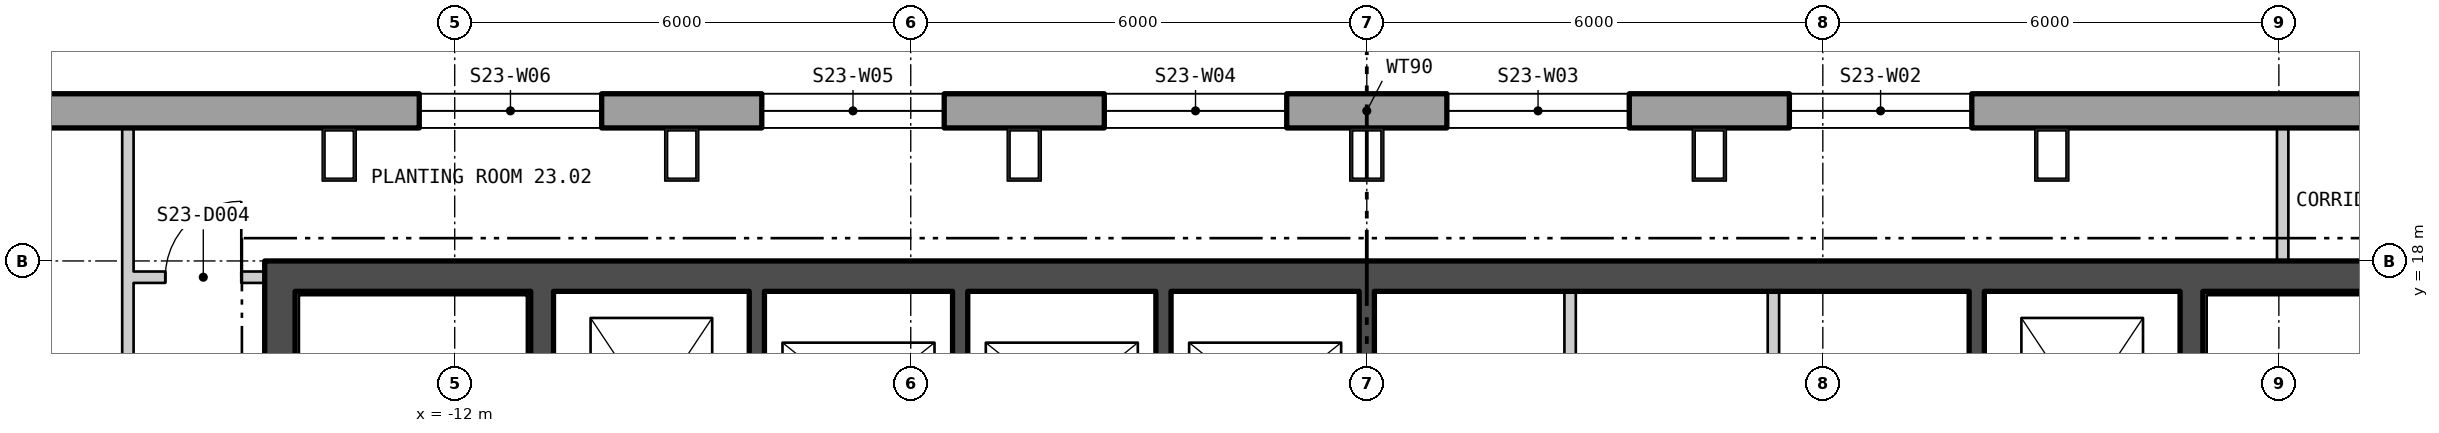
"""IFC4 building model, lengths in metres.
Left out: names, types, materials, properties, quantities, classifications, styles, units other than length and angle.
Written with IfcOpenShell. Run it as: python <this file> out.ifc"""

import sys

from ifc_helpers import new_model, si_unit, direction, frame, frame_2d, origin, origin_2d, place, context, subcontext, project, spatial, polyline, rectangle, hollow_rectangle, outline, extrude, element, fill, save


model = new_model("IFC4")
c1 = context("Model", 3, precision=1e-05, world=origin(), true_north=direction((0.0, 1.0)))
c2 = subcontext(c1, "Body", "Model", "MODEL_VIEW")
j1 = project(units=[si_unit("LENGTHUNIT", "METRE"), si_unit("PLANEANGLEUNIT", "RADIAN")], contexts=[c1])
p1 = place(None, origin())
s1 = spatial("IfcSite", under=j1, at=p1, CompositionType="ELEMENT")
p2 = place(p1, origin())
s2 = spatial("IfcBuilding", under=s1, at=p2, CompositionType="ELEMENT")
p3 = place(p2, frame((0.0, 0.0, 304.2)))
s3 = spatial("IfcBuildingStorey", under=s2, at=p3, CompositionType="ELEMENT", Elevation=304.2)
for number, where, z_axis, x_axis in (
    (1, (9.013, 19.4, 0.0), (0.0, 0.0, 1.0), (-1.0, 0.0, 0.0)),
    (2, (4.507, 19.4, 0.0), (0.0, 0.0, 1.0), (-1.0, 0.0, 0.0)),
    (3, (0.0, 19.4, 0.0), (0.0, 0.0, 1.0), (-1.0, 0.0, 0.0)),
    (4, (-4.507, 19.4, 0.0), (0.0, 0.0, 1.0), (-1.0, 0.0, 0.0)),
    (5, (-9.013, 19.4, 0.0), (0.0, 0.0, 1.0), (-1.0, 0.0, 0.0)),
    (6, (-13.52, 19.4, 0.0), (0.0, 0.0, 1.0), (-1.0, 0.0, 0.0)),
):
    element("IfcColumn", number, at=place(p3, frame(where, z_axis=z_axis, x_axis=x_axis)), inside=s3, PredefinedType="COLUMN", context=c2, shape_type="SweptSolid", body=[
        extrude(hollow_rectangle(XDim=0.45, YDim=0.7, WallThickness=0.04, at=origin_2d()), origin(), (0.0, 0.0, 1.0), 4.2),
    ])
p4 = place(p3, frame((22.865, 19.975, -0.4), z_axis=(0.0, 0.0, 1.0), x_axis=(-1.0, 0.0, 0.0)))
e7 = element("IfcWall", 7, at=p4, inside=s3, PredefinedType="SOLIDWALL", context=c2, shape_type="SweptSolid", body=[
    extrude(outline(polyline([(-0.13, -0.225), (45.86, -0.225), (45.6, 0.225), (0.13, 0.225), (-0.13, -0.225)])), origin(), (0.0, 0.0, 1.0), 4.2),
])
p5 = place(p4, frame((1.424, 0.0, 1.3)))
e8 = element("IfcOpeningElement", 8, at=p5, cuts=e7, PredefinedType="OPENING", context=c2, shape_type="SweptSolid", body=[
    extrude(rectangle(XDim=2.4, YDim=2.3, at=frame_2d((1.2, 1.15))), frame((0.0, 0.235, 0.0), z_axis=(0.0, -1.0, 0.0), x_axis=(1.0, 0.0, 0.0)), (0.0, 0.0, 1.0), 0.47),
])
p6 = place(p4, frame((14.905, 0.0, 1.3)))
e9 = element("IfcOpeningElement", 9, at=p6, cuts=e7, PredefinedType="OPENING", context=c2, shape_type="SweptSolid", body=[
    extrude(rectangle(XDim=2.4, YDim=2.3, at=frame_2d((1.2, 1.15))), frame((0.0, 0.235, 0.0), z_axis=(0.0, -1.0, 0.0), x_axis=(1.0, 0.0, 0.0)), (0.0, 0.0, 1.0), 0.47),
])
p7 = place(p4, frame((19.412, 0.0, 1.3)))
e10 = element("IfcOpeningElement", 10, at=p7, cuts=e7, PredefinedType="OPENING", context=c2, shape_type="SweptSolid", body=[
    extrude(rectangle(XDim=2.4, YDim=2.3, at=frame_2d((1.2, 1.15))), frame((0.0, 0.235, 0.0), z_axis=(0.0, -1.0, 0.0), x_axis=(1.0, 0.0, 0.0)), (0.0, 0.0, 1.0), 0.47),
])
p8 = place(p4, frame((23.918, 0.0, 1.3)))
e11 = element("IfcOpeningElement", 11, at=p8, cuts=e7, PredefinedType="OPENING", context=c2, shape_type="SweptSolid", body=[
    extrude(rectangle(XDim=2.4, YDim=2.3, at=frame_2d((1.2, 1.15))), frame((0.0, 0.235, 0.0), z_axis=(0.0, -1.0, 0.0), x_axis=(1.0, 0.0, 0.0)), (0.0, 0.0, 1.0), 0.47),
])
p9 = place(p4, frame((28.425, 0.0, 1.3)))
e12 = element("IfcOpeningElement", 12, at=p9, cuts=e7, PredefinedType="OPENING", context=c2, shape_type="SweptSolid", body=[
    extrude(rectangle(XDim=2.4, YDim=2.3, at=frame_2d((1.2, 1.15))), frame((0.0, 0.235, 0.0), z_axis=(0.0, -1.0, 0.0), x_axis=(1.0, 0.0, 0.0)), (0.0, 0.0, 1.0), 0.47),
])
p10 = place(p4, frame((32.932, 0.0, 1.3)))
e13 = element("IfcOpeningElement", 13, at=p10, cuts=e7, PredefinedType="OPENING", context=c2, shape_type="SweptSolid", body=[
    extrude(rectangle(XDim=2.4, YDim=2.3, at=frame_2d((1.2, 1.15))), frame((0.0, 0.235, 0.0), z_axis=(0.0, -1.0, 0.0), x_axis=(1.0, 0.0, 0.0)), (0.0, 0.0, 1.0), 0.47),
])
p11 = place(p4, frame((41.907, 0.0, 1.3)))
e14 = element("IfcOpeningElement", 14, at=p11, cuts=e7, PredefinedType="OPENING", context=c2, shape_type="SweptSolid", body=[
    extrude(rectangle(XDim=2.4, YDim=2.3, at=frame_2d((1.2, 1.15))), frame((0.0, 0.235, 0.0), z_axis=(0.0, -1.0, 0.0), x_axis=(1.0, 0.0, 0.0)), (0.0, 0.0, 1.0), 0.47),
])
p12 = place(p3, frame((-14.5, 17.8, 0.0), z_axis=(0.0, 0.0, 1.0), x_axis=(1.0, 0.0, 0.0)))
e15 = element("IfcWall", 15, at=p12, inside=s3, PredefinedType="SHEAR", context=c2, shape_type="SweptSolid", body=[
    extrude(rectangle(XDim=29.0, YDim=0.4, at=frame_2d((14.5, 0.0))), origin(), (0.0, 0.0, 1.0), 4.0),
])
p13 = place(p3, frame((-14.3, 4.4, 0.0), z_axis=(0.0, 0.0, 1.0), x_axis=(0.0, 1.0, 0.0)))
e16 = element("IfcWall", 16, at=p13, inside=s3, PredefinedType="SHEAR", context=c2, shape_type="SweptSolid", body=[
    extrude(rectangle(XDim=13.2, YDim=0.4, at=frame_2d((6.6, 0.0))), origin(), (0.0, 0.0, 1.0), 4.0),
])
p14 = place(p13, frame((3.05, 0.0, 0.0)))
e17 = element("IfcOpeningElement", 17, at=p14, cuts=e16, PredefinedType="OPENING", context=c2, shape_type="SweptSolid", body=[
    extrude(rectangle(XDim=1.5, YDim=2.1, at=frame_2d((0.75, 1.05))), frame((0.0, 0.21, 0.0), z_axis=(0.0, -1.0, 0.0), x_axis=(1.0, 0.0, 0.0)), (0.0, 0.0, 1.0), 0.42),
])
p15 = place(p3, frame((-10.85, 4.4, 0.0), z_axis=(0.0, 0.0, 1.0), x_axis=(0.0, 1.0, 0.0)))
e18 = element("IfcWall", 18, at=p15, inside=s3, PredefinedType="SHEAR", context=c2, shape_type="SweptSolid", body=[
    extrude(rectangle(XDim=13.2, YDim=0.3, at=frame_2d((6.6, 0.0))), origin(), (0.0, 0.0, 1.0), 4.0),
])
p16 = place(p15, frame((1.575, 0.0, 0.0)))
e19 = element("IfcOpeningElement", 19, at=p16, cuts=e18, PredefinedType="OPENING", context=c2, shape_type="SweptSolid", body=[
    extrude(rectangle(XDim=1.25, YDim=2.1, at=frame_2d((0.625, 1.05))), frame((0.0, 0.16, 0.0), z_axis=(0.0, -1.0, 0.0), x_axis=(1.0, 0.0, 0.0)), (0.0, 0.0, 1.0), 0.32),
])
p17 = place(p15, frame((0.4, 0.0, 0.0)))
e20 = element("IfcOpeningElement", 20, at=p17, cuts=e18, PredefinedType="OPENING", context=c2, shape_type="SweptSolid", body=[
    extrude(rectangle(XDim=0.9, YDim=2.1, at=frame_2d((0.45, 1.05))), frame((0.0, 0.16, 0.0), z_axis=(0.0, -1.0, 0.0), x_axis=(1.0, 0.0, 0.0)), (0.0, 0.0, 1.0), 0.32),
])
p18 = place(p3, frame((10.85, 4.4, 0.0), z_axis=(0.0, 0.0, 1.0), x_axis=(0.0, 1.0, 0.0)))
e21 = element("IfcWall", 21, at=p18, inside=s3, PredefinedType="SHEAR", context=c2, shape_type="SweptSolid", body=[
    extrude(rectangle(XDim=13.2, YDim=0.3, at=frame_2d((6.6, 0.0))), origin(), (0.0, 0.0, 1.0), 4.0),
])
p19 = place(p18, frame((1.575, 0.0, 0.0)))
e22 = element("IfcOpeningElement", 22, at=p19, cuts=e21, PredefinedType="OPENING", context=c2, shape_type="SweptSolid", body=[
    extrude(rectangle(XDim=1.25, YDim=2.1, at=frame_2d((0.625, 1.05))), frame((0.0, 0.16, 0.0), z_axis=(0.0, -1.0, 0.0), x_axis=(1.0, 0.0, 0.0)), (0.0, 0.0, 1.0), 0.32),
])
p20 = place(p18, frame((0.4, 0.0, 0.0)))
e23 = element("IfcOpeningElement", 23, at=p20, cuts=e21, PredefinedType="OPENING", context=c2, shape_type="SweptSolid", body=[
    extrude(rectangle(XDim=0.9, YDim=2.1, at=frame_2d((0.45, 1.05))), frame((0.0, 0.16, 0.0), z_axis=(0.0, -1.0, 0.0), x_axis=(1.0, 0.0, 0.0)), (0.0, 0.0, 1.0), 0.32),
])
for number, where, z_axis, x_axis in (
    (24, (-8.025, 14.7, 0.0), (0.0, 0.0, 1.0), (0.0, 1.0, 0.0)),
    (25, (-5.35, 14.7, 0.0), (0.0, 0.0, 1.0), (0.0, 1.0, 0.0)),
    (26, (-2.675, 14.7, 0.0), (0.0, 0.0, 1.0), (0.0, 1.0, 0.0)),
    (27, (0.0, 14.7, 0.0), (0.0, 0.0, 1.0), (0.0, 1.0, 0.0)),
):
    element("IfcWall", number, at=place(p3, frame(where, z_axis=z_axis, x_axis=x_axis)), inside=s3, PredefinedType="SHEAR", context=c2, shape_type="SweptSolid", body=[
        extrude(rectangle(XDim=2.9, YDim=0.2, at=frame_2d((1.45, 0.0))), origin(), (0.0, 0.0, 1.0), 4.0),
    ])
for number, where, z_axis, x_axis in (
    (28, (2.675, 14.7, 0.0), (0.0, 0.0, 1.0), (0.0, 1.0, 0.0)),
    (29, (5.35, 14.7, 0.0), (0.0, 0.0, 1.0), (0.0, 1.0, 0.0)),
):
    element("IfcWall", number, at=place(p3, frame(where, z_axis=z_axis, x_axis=x_axis)), inside=s3, PredefinedType="PARTITIONING", context=c2, shape_type="SweptSolid", body=[
        extrude(rectangle(XDim=2.9, YDim=0.15, at=frame_2d((1.45, 0.0))), origin(), (0.0, 0.0, 1.0), 4.0),
    ])
p21 = place(p3, frame((8.025, 14.7, 0.0), z_axis=(0.0, 0.0, 1.0), x_axis=(0.0, 1.0, 0.0)))
e30 = element("IfcWall", 30, at=p21, inside=s3, PredefinedType="SHEAR", context=c2, shape_type="SweptSolid", body=[
    extrude(rectangle(XDim=2.9, YDim=0.2, at=frame_2d((1.45, 0.0))), origin(), (0.0, 0.0, 1.0), 4.0),
])
p22 = place(p3, frame((-16.3, 2.125, 0.0), z_axis=(0.0, 0.0, 1.0), x_axis=(0.0, 1.0, 0.0)))
e31 = element("IfcWall", 31, at=p22, inside=s3, PredefinedType="PARTITIONING", context=c2, shape_type="SweptSolid", body=[
    extrude(rectangle(XDim=17.623, YDim=0.15, at=frame_2d((8.812, 0.0))), origin(), (0.0, 0.0, 1.0), 4.0),
])
p23 = place(p22, frame((5.078, 0.0, 0.0)))
e32 = element("IfcOpeningElement", 32, at=p23, cuts=e31, PredefinedType="OPENING", context=c2, shape_type="SweptSolid", body=[
    extrude(rectangle(XDim=1.0, YDim=2.1, at=frame_2d((0.5, 1.05))), frame((0.0, 0.085, 0.0), z_axis=(0.0, -1.0, 0.0), x_axis=(1.0, 0.0, 0.0)), (0.0, 0.0, 1.0), 0.17),
])
p24 = place(p22, frame((12.654, 0.0, 0.0)))
e33 = element("IfcOpeningElement", 33, at=p24, cuts=e31, PredefinedType="OPENING", context=c2, shape_type="SweptSolid", body=[
    extrude(rectangle(XDim=1.8, YDim=2.1, at=frame_2d((0.9, 1.05))), frame((0.0, 0.085, 0.0), z_axis=(0.0, -1.0, 0.0), x_axis=(1.0, 0.0, 0.0)), (0.0, 0.0, 1.0), 0.17),
])
p25 = place(p3, frame((-16.225, 17.786, 0.0), z_axis=(0.0, 0.0, 1.0), x_axis=(1.0, 0.0, 0.0)))
e34 = element("IfcWall", 34, at=p25, inside=s3, PredefinedType="PARTITIONING", context=c2, shape_type="SweptSolid", body=[
    extrude(rectangle(XDim=1.725, YDim=0.15, at=frame_2d((0.863, 0.0))), origin(), (0.0, 0.0, 1.0), 4.0),
])
p26 = place(p25, frame((0.417, 0.0, 0.0)))
e35 = element("IfcOpeningElement", 35, at=p26, cuts=e34, PredefinedType="OPENING", context=c2, shape_type="SweptSolid", body=[
    extrude(rectangle(XDim=1.0, YDim=2.1, at=frame_2d((0.5, 1.05))), frame((0.0, 0.085, 0.0), z_axis=(0.0, -1.0, 0.0), x_axis=(1.0, 0.0, 0.0)), (0.0, 0.0, 1.0), 0.17),
])
p27 = place(p3, frame((12.05, 18.0, 0.0), z_axis=(0.0, 0.0, 1.0), x_axis=(0.0, 1.0, 0.0)))
e36 = element("IfcWall", 36, at=p27, inside=s3, PredefinedType="PARTITIONING", context=c2, shape_type="SweptSolid", body=[
    extrude(rectangle(XDim=1.75, YDim=0.15, at=frame_2d((0.875, 0.0))), origin(), (0.0, 0.0, 1.0), 4.0),
])
p28 = place(p6, origin())
e37 = element("IfcWindow", 37, at=p28, inside=s3, PartitioningType="SINGLE_PANEL", PredefinedType="WINDOW", context=c2, shape_type="SweptSolid", body=[
    extrude(rectangle(XDim=2.4, YDim=2.3, at=frame_2d((1.2, 1.15))), frame((0.0, 0.105, 0.0), z_axis=(0.0, -1.0, 0.0), x_axis=(1.0, 0.0, 0.0)), (0.0, 0.0, 1.0), 0.06),
])
fill(e9, e37)
p29 = place(p7, origin())
e38 = element("IfcWindow", 38, at=p29, inside=s3, PartitioningType="SINGLE_PANEL", PredefinedType="WINDOW", context=c2, shape_type="SweptSolid", body=[
    extrude(rectangle(XDim=2.4, YDim=2.3, at=frame_2d((1.2, 1.15))), frame((0.0, 0.105, 0.0), z_axis=(0.0, -1.0, 0.0), x_axis=(1.0, 0.0, 0.0)), (0.0, 0.0, 1.0), 0.06),
])
fill(e10, e38)
p30 = place(p8, origin())
e39 = element("IfcWindow", 39, at=p30, inside=s3, PartitioningType="SINGLE_PANEL", PredefinedType="WINDOW", context=c2, shape_type="SweptSolid", body=[
    extrude(rectangle(XDim=2.4, YDim=2.3, at=frame_2d((1.2, 1.15))), frame((0.0, 0.105, 0.0), z_axis=(0.0, -1.0, 0.0), x_axis=(1.0, 0.0, 0.0)), (0.0, 0.0, 1.0), 0.06),
])
fill(e11, e39)
p31 = place(p9, origin())
e40 = element("IfcWindow", 40, at=p31, inside=s3, PartitioningType="SINGLE_PANEL", PredefinedType="WINDOW", context=c2, shape_type="SweptSolid", body=[
    extrude(rectangle(XDim=2.4, YDim=2.3, at=frame_2d((1.2, 1.15))), frame((0.0, 0.105, 0.0), z_axis=(0.0, -1.0, 0.0), x_axis=(1.0, 0.0, 0.0)), (0.0, 0.0, 1.0), 0.06),
])
fill(e12, e40)
p32 = place(p10, origin())
e41 = element("IfcWindow", 41, at=p32, inside=s3, PartitioningType="SINGLE_PANEL", PredefinedType="WINDOW", context=c2, shape_type="SweptSolid", body=[
    extrude(rectangle(XDim=2.4, YDim=2.3, at=frame_2d((1.2, 1.15))), frame((0.0, 0.105, 0.0), z_axis=(0.0, -1.0, 0.0), x_axis=(1.0, 0.0, 0.0)), (0.0, 0.0, 1.0), 0.06),
])
fill(e13, e41)
p33 = place(p26, origin())
e42 = element("IfcDoor", 42, at=p33, inside=s3, OperationType="SINGLE_SWING_LEFT", PredefinedType="DOOR", context=c2, shape_type="SweptSolid", body=[
    extrude(rectangle(XDim=1.0, YDim=2.1, at=frame_2d((0.5, 1.05))), frame((0.0, 0.025, 0.0), z_axis=(0.0, -1.0, 0.0), x_axis=(1.0, 0.0, 0.0)), (0.0, 0.0, 1.0), 0.05),
])
fill(e35, e42)
save(model, sys.argv[1])
